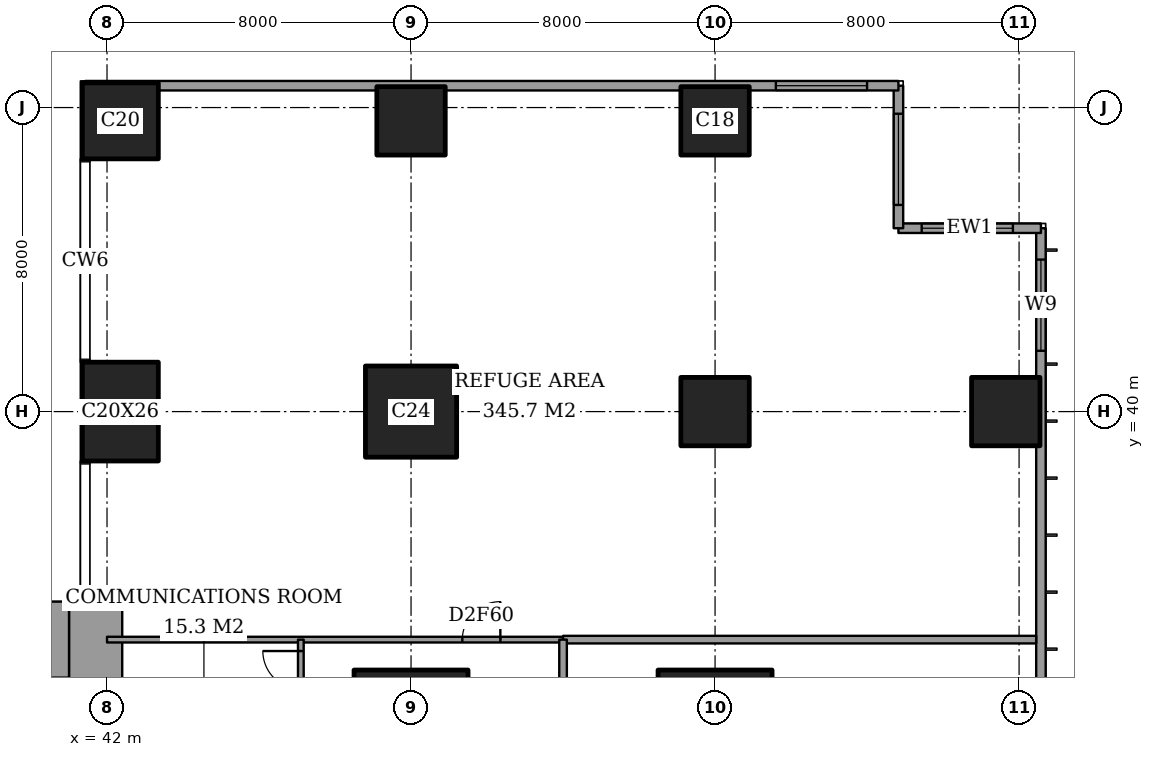
"""IFC4 building model, lengths in metres.
Left out: names, types, materials, properties, quantities, classifications, styles, units other than length and angle.
Written with IfcOpenShell. Run it as: python <this file> out.ifc"""

import sys

from ifc_helpers import new_model, si_unit, direction, frame, frame_2d, origin, origin_2d, place, context, subcontext, project, spatial, rectangle, extrude, element, fill, save


model = new_model("IFC4")
c1 = context("Model", 3, precision=1e-05, world=origin(), true_north=direction((0.0, 1.0)))
c2 = subcontext(c1, "Body", "Model", "MODEL_VIEW")
j1 = project(units=[si_unit("LENGTHUNIT", "METRE"), si_unit("PLANEANGLEUNIT", "RADIAN")], contexts=[c1])
p1 = place(None, origin())
s1 = spatial("IfcSite", under=j1, at=p1, CompositionType="ELEMENT")
p2 = place(p1, origin())
s2 = spatial("IfcBuilding", under=s1, at=p2, CompositionType="ELEMENT")
p3 = place(p2, frame((0.0, 0.0, 171.8)))
s3 = spatial("IfcBuildingStorey", under=s2, at=p3, CompositionType="ELEMENT", Elevation=171.8)
p4 = place(p3, frame((42.35, 40.0, 0.0), z_axis=(0.0, 0.0, 1.0), x_axis=(1.0, 0.0, 0.0)))
e1 = element("IfcColumn", 1, at=p4, inside=s3, PredefinedType="COLUMN", context=c2, shape_type="SweptSolid", body=[
    extrude(rectangle(XDim=2.0, YDim=2.6, at=origin_2d()), origin(), (0.0, 0.0, 1.0), 5.4),
])
p5 = place(p3, frame((42.35, 47.65, 0.0), z_axis=(0.0, 0.0, 1.0), x_axis=(1.0, 0.0, 0.0)))
e2 = element("IfcColumn", 2, at=p5, inside=s3, PredefinedType="COLUMN", context=c2, shape_type="SweptSolid", body=[
    extrude(rectangle(XDim=2.0, YDim=2.0, at=origin_2d()), origin(), (0.0, 0.0, 1.0), 5.4),
])
p6 = place(p3, frame((50.0, 32.0, 0.0), z_axis=(0.0, 0.0, 1.0), x_axis=(1.0, 0.0, 0.0)))
e3 = element("IfcColumn", 3, at=p6, inside=s3, PredefinedType="COLUMN", context=c2, shape_type="SweptSolid", body=[
    extrude(rectangle(XDim=3.0, YDim=2.4, at=origin_2d()), origin(), (0.0, 0.0, 1.0), 5.4),
])
p7 = place(p3, frame((50.0, 40.0, 0.0), z_axis=(0.0, 0.0, 1.0), x_axis=(1.0, 0.0, 0.0)))
e4 = element("IfcColumn", 4, at=p7, inside=s3, PredefinedType="COLUMN", context=c2, shape_type="SweptSolid", body=[
    extrude(rectangle(XDim=2.4, YDim=2.4, at=origin_2d()), origin(), (0.0, 0.0, 1.0), 5.4),
])
p8 = place(p3, frame((50.0, 47.65, 0.0), z_axis=(0.0, 0.0, 1.0), x_axis=(1.0, 0.0, 0.0)))
e5 = element("IfcColumn", 5, at=p8, inside=s3, PredefinedType="COLUMN", context=c2, shape_type="SweptSolid", body=[
    extrude(rectangle(XDim=1.8, YDim=1.8, at=origin_2d()), origin(), (0.0, 0.0, 1.0), 5.4),
])
p9 = place(p3, frame((58.0, 32.0, 0.0), z_axis=(0.0, 0.0, 1.0), x_axis=(1.0, 0.0, 0.0)))
e6 = element("IfcColumn", 6, at=p9, inside=s3, PredefinedType="COLUMN", context=c2, shape_type="SweptSolid", body=[
    extrude(rectangle(XDim=3.0, YDim=2.4, at=origin_2d()), origin(), (0.0, 0.0, 1.0), 5.4),
])
for number, where, z_axis, x_axis in (
    (7, (58.0, 40.0, 0.0), (0.0, 0.0, 1.0), (1.0, 0.0, 0.0)),
    (8, (58.0, 47.65, 0.0), (0.0, 0.0, 1.0), (1.0, 0.0, 0.0)),
    (9, (65.65, 40.0, 0.0), (0.0, 0.0, 1.0), (1.0, 0.0, 0.0)),
):
    element("IfcColumn", number, at=place(p3, frame(where, z_axis=z_axis, x_axis=x_axis)), inside=s3, PredefinedType="COLUMN", context=c2, shape_type="SweptSolid", body=[
        extrude(rectangle(XDim=1.8, YDim=1.8, at=origin_2d()), origin(), (0.0, 0.0, 1.0), 5.4),
    ])
p10 = place(p3, frame((37.85, 34.0, 0.0), z_axis=(0.0, 0.0, 1.0), x_axis=(1.0, 0.0, 0.0)))
e10 = element("IfcWall", 10, at=p10, inside=s3, PredefinedType="SHEAR", context=c2, shape_type="SweptSolid", body=[
    extrude(rectangle(XDim=3.15, YDim=2.0, at=frame_2d((1.575, 0.0))), origin(), (0.0, 0.0, 1.0), 5.4),
])
p11 = place(p3, frame((41.7, 24.85, 0.0), z_axis=(0.0, 0.0, 1.0), x_axis=(0.0, 1.0, 0.0)))
e11 = element("IfcWall", 11, at=p11, inside=s3, PredefinedType="SHEAR", context=c2, shape_type="SweptSolid", body=[
    extrude(rectangle(XDim=10.15, YDim=1.4, at=frame_2d((5.075, 0.0))), origin(), (0.0, 0.0, 1.0), 5.4),
])
p12 = place(p3, frame((66.575, 3.175, 0.0), z_axis=(0.0, 0.0, 1.0), x_axis=(0.0, 1.0, 0.0)))
e12 = element("IfcWall", 12, at=p12, inside=s3, PredefinedType="SOLIDWALL", context=c2, shape_type="SweptSolid", body=[
    extrude(rectangle(XDim=41.65, YDim=0.25, at=frame_2d((20.825, 0.0))), origin(), (0.0, 0.0, 1.0), 5.4),
])
p13 = place(p12, frame((0.825, 0.0, 0.9)))
e13 = element("IfcOpeningElement", 13, at=p13, cuts=e12, PredefinedType="OPENING", context=c2, shape_type="SweptSolid", body=[
    extrude(rectangle(XDim=2.4, YDim=2.4, at=frame_2d((1.2, 1.2))), frame((0.0, 0.135, 0.0), z_axis=(0.0, -1.0, 0.0), x_axis=(1.0, 0.0, 0.0)), (0.0, 0.0, 1.0), 0.27),
])
p14 = place(p12, frame((38.425, 0.0, 0.9)))
e14 = element("IfcOpeningElement", 14, at=p14, cuts=e12, PredefinedType="OPENING", context=c2, shape_type="SweptSolid", body=[
    extrude(rectangle(XDim=2.4, YDim=2.4, at=frame_2d((1.2, 1.2))), frame((0.0, 0.135, 0.0), z_axis=(0.0, -1.0, 0.0), x_axis=(1.0, 0.0, 0.0)), (0.0, 0.0, 1.0), 0.27),
])
p15 = place(p3, frame((66.575, 44.825, 0.0), z_axis=(0.0, 0.0, 1.0), x_axis=(-1.0, 0.0, 0.0)))
e15 = element("IfcWall", 15, at=p15, inside=s3, PredefinedType="SOLIDWALL", context=c2, shape_type="SweptSolid", body=[
    extrude(rectangle(XDim=3.75, YDim=0.25, at=frame_2d((1.875, 0.0))), origin(), (0.0, 0.0, 1.0), 5.4),
])
p16 = place(p15, frame((0.738, 0.0, 0.9)))
e16 = element("IfcOpeningElement", 16, at=p16, cuts=e15, PredefinedType="OPENING", context=c2, shape_type="SweptSolid", body=[
    extrude(rectangle(XDim=2.4, YDim=2.4, at=frame_2d((1.2, 1.2))), frame((0.0, 0.135, 0.0), z_axis=(0.0, -1.0, 0.0), x_axis=(1.0, 0.0, 0.0)), (0.0, 0.0, 1.0), 0.27),
])
p17 = place(p3, frame((62.825, 44.825, 0.0), z_axis=(0.0, 0.0, 1.0), x_axis=(0.0, 1.0, 0.0)))
e17 = element("IfcWall", 17, at=p17, inside=s3, PredefinedType="SOLIDWALL", context=c2, shape_type="SweptSolid", body=[
    extrude(rectangle(XDim=3.75, YDim=0.25, at=frame_2d((1.875, 0.0))), origin(), (0.0, 0.0, 1.0), 5.4),
])
p18 = place(p17, frame((0.613, 0.0, 0.9)))
e18 = element("IfcOpeningElement", 18, at=p18, cuts=e17, PredefinedType="OPENING", context=c2, shape_type="SweptSolid", body=[
    extrude(rectangle(XDim=2.4, YDim=2.4, at=frame_2d((1.2, 1.2))), frame((0.0, 0.135, 0.0), z_axis=(0.0, -1.0, 0.0), x_axis=(1.0, 0.0, 0.0)), (0.0, 0.0, 1.0), 0.27),
])
p19 = place(p3, frame((62.825, 48.575, 0.0), z_axis=(0.0, 0.0, 1.0), x_axis=(-1.0, 0.0, 0.0)))
e19 = element("IfcWall", 19, at=p19, inside=s3, PredefinedType="SOLIDWALL", context=c2, shape_type="SweptSolid", body=[
    extrude(rectangle(XDim=21.4, YDim=0.25, at=frame_2d((10.7, 0.0))), origin(), (0.0, 0.0, 1.0), 5.4),
])
p20 = place(p19, frame((0.825, 0.0, 0.9)))
e20 = element("IfcOpeningElement", 20, at=p20, cuts=e19, PredefinedType="OPENING", context=c2, shape_type="SweptSolid", body=[
    extrude(rectangle(XDim=2.4, YDim=2.4, at=frame_2d((1.2, 1.2))), frame((0.0, 0.135, 0.0), z_axis=(0.0, -1.0, 0.0), x_axis=(1.0, 0.0, 0.0)), (0.0, 0.0, 1.0), 0.27),
])
p21 = place(p3, frame((54.0, 34.0, 0.0), z_axis=(0.0, 0.0, 1.0), x_axis=(1.0, 0.0, 0.0)))
e21 = element("IfcWall", 21, at=p21, inside=s3, PredefinedType="PARTITIONING", context=c2, shape_type="SweptSolid", body=[
    extrude(rectangle(XDim=12.45, YDim=0.2, at=frame_2d((6.225, 0.0))), origin(), (0.0, 0.0, 1.0), 5.15),
])
p22 = place(p3, frame((42.0, 34.0, 0.0), z_axis=(0.0, 0.0, 1.0), x_axis=(1.0, 0.0, 0.0)))
e22 = element("IfcWall", 22, at=p22, inside=s3, PredefinedType="PARTITIONING", context=c2, shape_type="SweptSolid", body=[
    extrude(rectangle(XDim=12.0, YDim=0.15, at=frame_2d((6.0, 0.0))), origin(), (0.0, 0.0, 1.0), 5.15),
])
p23 = place(p22, frame((9.35, 0.0, 0.0)))
e23 = element("IfcOpeningElement", 23, at=p23, cuts=e22, PredefinedType="OPENING", context=c2, shape_type="SweptSolid", body=[
    extrude(rectangle(XDim=1.0, YDim=2.1, at=frame_2d((0.5, 1.05))), frame((0.0, 0.085, 0.0), z_axis=(0.0, -1.0, 0.0), x_axis=(1.0, 0.0, 0.0)), (0.0, 0.0, 1.0), 0.17),
])
p24 = place(p3, frame((47.1, 31.0, 0.0), z_axis=(0.0, 0.0, 1.0), x_axis=(0.0, 1.0, 0.0)))
e24 = element("IfcWall", 24, at=p24, inside=s3, PredefinedType="PARTITIONING", context=c2, shape_type="SweptSolid", body=[
    extrude(rectangle(XDim=3.0, YDim=0.15, at=frame_2d((1.5, 0.0))), origin(), (0.0, 0.0, 1.0), 5.15),
])
p25 = place(p24, frame((1.7, 0.0, 0.0)))
e25 = element("IfcOpeningElement", 25, at=p25, cuts=e24, PredefinedType="OPENING", context=c2, shape_type="SweptSolid", body=[
    extrude(rectangle(XDim=1.0, YDim=2.1, at=frame_2d((0.5, 1.05))), frame((0.0, 0.085, 0.0), z_axis=(0.0, -1.0, 0.0), x_axis=(1.0, 0.0, 0.0)), (0.0, 0.0, 1.0), 0.17),
])
p26 = place(p3, frame((54.0, 30.725, 0.0), z_axis=(0.0, 0.0, 1.0), x_axis=(0.0, 1.0, 0.0)))
e26 = element("IfcWall", 26, at=p26, inside=s3, PredefinedType="PARTITIONING", context=c2, shape_type="SweptSolid", body=[
    extrude(rectangle(XDim=3.275, YDim=0.2, at=frame_2d((1.637, 0.0))), origin(), (0.0, 0.0, 1.0), 5.15),
])
p27 = place(p14, origin())
e27 = element("IfcWindow", 27, at=p27, inside=s3, PartitioningType="SINGLE_PANEL", PredefinedType="WINDOW", context=c2, shape_type="SweptSolid", body=[
    extrude(rectangle(XDim=2.4, YDim=2.4, at=frame_2d((1.2, 1.2))), frame((0.0, 0.03, 0.0), z_axis=(0.0, -1.0, 0.0), x_axis=(1.0, 0.0, 0.0)), (0.0, 0.0, 1.0), 0.06),
])
fill(e14, e27)
p28 = place(p16, origin())
e28 = element("IfcWindow", 28, at=p28, inside=s3, PartitioningType="SINGLE_PANEL", PredefinedType="WINDOW", context=c2, shape_type="SweptSolid", body=[
    extrude(rectangle(XDim=2.4, YDim=2.4, at=frame_2d((1.2, 1.2))), frame((0.0, 0.03, 0.0), z_axis=(0.0, -1.0, 0.0), x_axis=(1.0, 0.0, 0.0)), (0.0, 0.0, 1.0), 0.06),
])
fill(e16, e28)
p29 = place(p18, origin())
e29 = element("IfcWindow", 29, at=p29, inside=s3, PartitioningType="SINGLE_PANEL", PredefinedType="WINDOW", context=c2, shape_type="SweptSolid", body=[
    extrude(rectangle(XDim=2.4, YDim=2.4, at=frame_2d((1.2, 1.2))), frame((0.0, 0.03, 0.0), z_axis=(0.0, -1.0, 0.0), x_axis=(1.0, 0.0, 0.0)), (0.0, 0.0, 1.0), 0.06),
])
fill(e18, e29)
p30 = place(p20, origin())
e30 = element("IfcWindow", 30, at=p30, inside=s3, PartitioningType="SINGLE_PANEL", PredefinedType="WINDOW", context=c2, shape_type="SweptSolid", body=[
    extrude(rectangle(XDim=2.4, YDim=2.4, at=frame_2d((1.2, 1.2))), frame((0.0, 0.03, 0.0), z_axis=(0.0, -1.0, 0.0), x_axis=(1.0, 0.0, 0.0)), (0.0, 0.0, 1.0), 0.06),
])
fill(e20, e30)
p31 = place(p23, origin())
e31 = element("IfcDoor", 31, at=p31, inside=s3, OperationType="SINGLE_SWING_LEFT", PredefinedType="DOOR", context=c2, shape_type="SweptSolid", body=[
    extrude(rectangle(XDim=1.0, YDim=2.1, at=frame_2d((0.5, 1.05))), frame((0.0, 0.025, 0.0), z_axis=(0.0, -1.0, 0.0), x_axis=(1.0, 0.0, 0.0)), (0.0, 0.0, 1.0), 0.05),
])
fill(e23, e31)
p32 = place(p25, origin())
e32 = element("IfcDoor", 32, at=p32, inside=s3, OperationType="SINGLE_SWING_LEFT", PredefinedType="DOOR", context=c2, shape_type="SweptSolid", body=[
    extrude(rectangle(XDim=1.0, YDim=2.1, at=frame_2d((0.5, 1.05))), frame((0.0, 0.025, 0.0), z_axis=(0.0, -1.0, 0.0), x_axis=(1.0, 0.0, 0.0)), (0.0, 0.0, 1.0), 0.05),
])
fill(e25, e32)
save(model, sys.argv[1])
